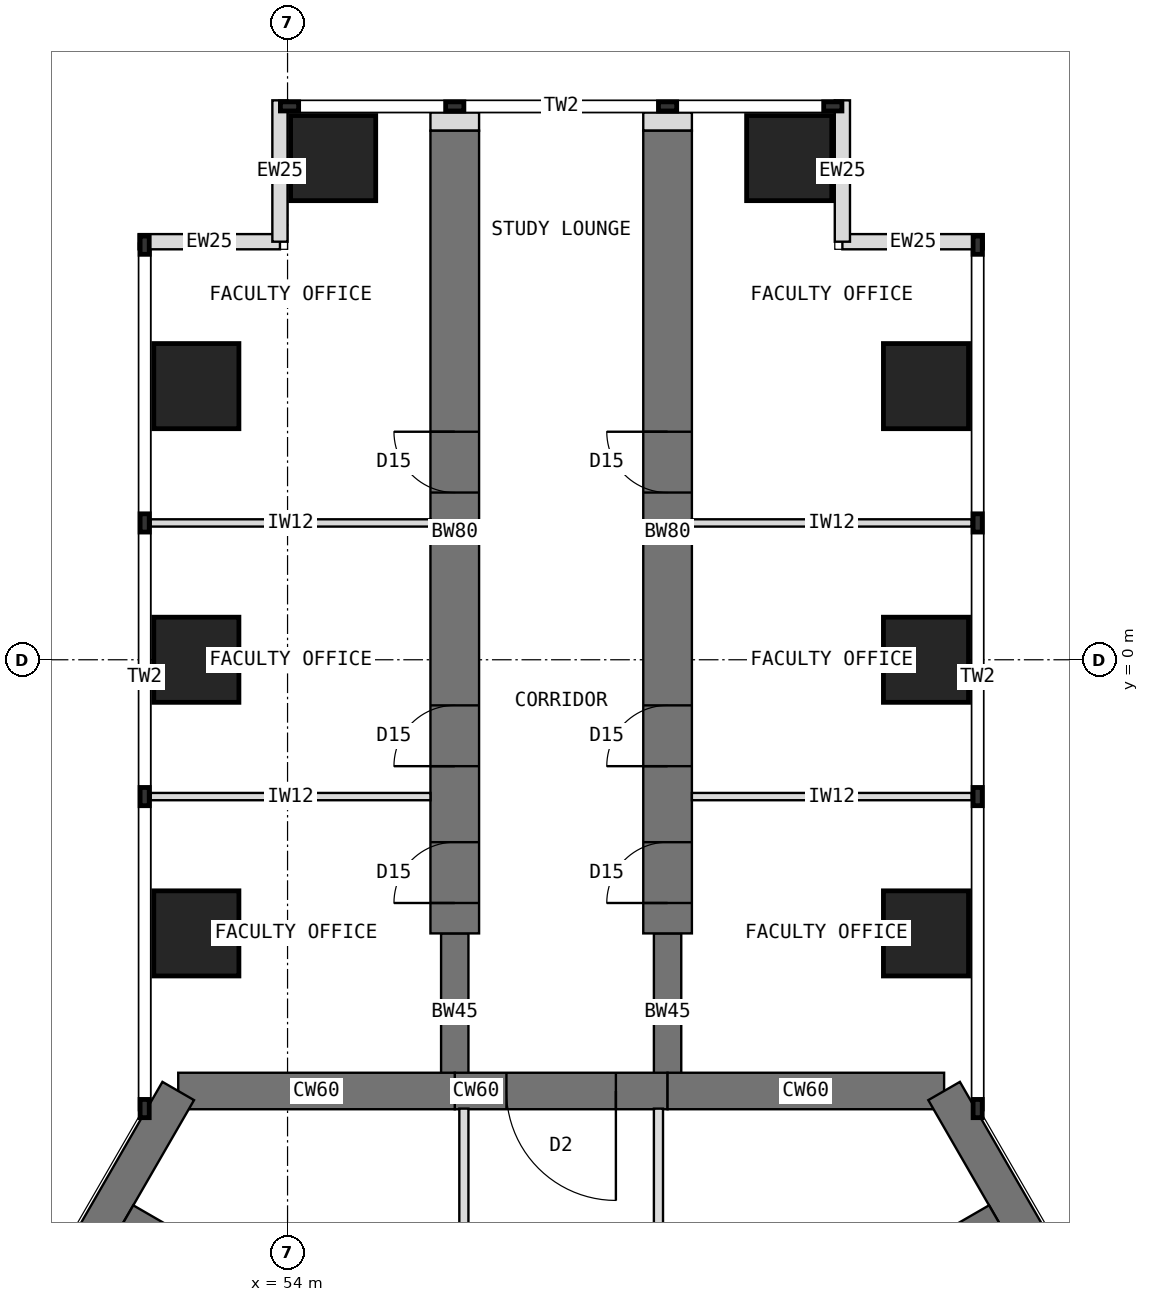
"""IFC4 building model, lengths in metres.
Left out: names, types, materials, properties, quantities, classifications, styles, units other than length and angle.
Written with IfcOpenShell. Run it as: python <this file> out.ifc"""

import sys

from ifc_helpers import new_model, si_unit, direction, frame, frame_2d, origin, origin_2d, place, context, subcontext, project, spatial, rectangle, extrude, element, fill, save


model = new_model("IFC4")
c1 = context("Model", 3, precision=1e-05, world=origin(), true_north=direction((0.0, 1.0)))
c2 = subcontext(c1, "Body", "Model", "MODEL_VIEW")
j1 = project(units=[si_unit("LENGTHUNIT", "METRE"), si_unit("PLANEANGLEUNIT", "RADIAN")], contexts=[c1])
p1 = place(None, origin())
s1 = spatial("IfcSite", under=j1, at=p1, CompositionType="ELEMENT")
p2 = place(p1, origin())
s2 = spatial("IfcBuilding", under=s1, at=p2, CompositionType="ELEMENT")
p3 = place(p2, frame((0.0, 0.0, 97.5)))
s3 = spatial("IfcBuildingStorey", under=s2, at=p3, CompositionType="ELEMENT", Elevation=97.5)
p4 = place(p3, frame((64.798, -7.092, 0.0), z_axis=(0.0, 0.0, 1.0), x_axis=(-1.0, 0.0, 0.0)))
e1 = element("IfcWall", 1, at=p4, inside=s3, PredefinedType="SHEAR", context=c2, shape_type="SweptSolid", body=[
    extrude(rectangle(XDim=4.548, YDim=0.6, at=frame_2d((2.274, 0.0))), origin(), (0.0, 0.0, 1.0), 4.0),
])
p5 = place(p3, frame((60.25, -7.092, 0.0), z_axis=(0.0, 0.0, 1.0), x_axis=(-1.0, 0.0, 0.0)))
e2 = element("IfcWall", 2, at=p5, inside=s3, PredefinedType="SHEAR", context=c2, shape_type="SweptSolid", body=[
    extrude(rectangle(XDim=3.5, YDim=0.6, at=frame_2d((1.75, 0.0))), origin(), (0.0, 0.0, 1.0), 4.0),
])
p6 = place(p5, frame((0.85, 0.0, 0.0)))
e3 = element("IfcOpeningElement", 3, at=p6, cuts=e2, PredefinedType="OPENING", context=c2, shape_type="SweptSolid", body=[
    extrude(rectangle(XDim=1.8, YDim=2.1, at=frame_2d((0.9, 1.05))), frame((0.0, 0.31, 0.0), z_axis=(0.0, -1.0, 0.0), x_axis=(1.0, 0.0, 0.0)), (0.0, 0.0, 1.0), 0.62),
])
p7 = place(p3, frame((56.75, -7.092, 0.0), z_axis=(0.0, 0.0, 1.0), x_axis=(-1.0, 0.0, 0.0)))
e4 = element("IfcWall", 4, at=p7, inside=s3, PredefinedType="SHEAR", context=c2, shape_type="SweptSolid", body=[
    extrude(rectangle(XDim=4.548, YDim=0.6, at=frame_2d((2.274, 0.0))), origin(), (0.0, 0.0, 1.0), 4.0),
])
for number, where, z_axis, x_axis in (
    (5, (52.202, -7.092, 0.0), (0.0, 0.0, 1.0), (-0.5, -0.866, 0.0)),
    (6, (71.096, -18.0, 0.0), (0.0, 0.0, 1.0), (-0.5, 0.866, 0.0)),
):
    element("IfcWall", number, at=place(p3, frame(where, z_axis=z_axis, x_axis=x_axis)), inside=s3, PredefinedType="SHEAR", context=c2, shape_type="SweptSolid", body=[
        extrude(rectangle(XDim=12.596, YDim=0.6, at=frame_2d((6.298, 0.0))), origin(), (0.0, 0.0, 1.0), 4.0),
    ])
p8 = place(p3, frame((56.75, -7.092, 0.0), z_axis=(0.0, 0.0, 1.0), x_axis=(0.0, 1.0, 0.0)))
e7 = element("IfcWall", 7, at=p8, inside=s3, PredefinedType="SHEAR", context=c2, shape_type="SweptSolid", body=[
    extrude(rectangle(XDim=2.592, YDim=0.45, at=frame_2d((1.296, 0.0))), origin(), (0.0, 0.0, 1.0), 4.0),
])
p9 = place(p3, frame((56.75, -4.5, 0.0), z_axis=(0.0, 0.0, 1.0), x_axis=(0.0, 1.0, 0.0)))
e8 = element("IfcWall", 8, at=p9, inside=s3, PredefinedType="SHEAR", context=c2, shape_type="SweptSolid", body=[
    extrude(rectangle(XDim=13.2, YDim=0.8, at=frame_2d((6.6, 0.0))), origin(), (0.0, 0.0, 1.0), 4.0),
])
p10 = place(p9, frame((0.5, 0.0, 0.0)))
e9 = element("IfcOpeningElement", 9, at=p10, cuts=e8, PredefinedType="OPENING", context=c2, shape_type="SweptSolid", body=[
    extrude(rectangle(XDim=1.0, YDim=2.1, at=frame_2d((0.5, 1.05))), frame((0.0, 0.41, 0.0), z_axis=(0.0, -1.0, 0.0), x_axis=(1.0, 0.0, 0.0)), (0.0, 0.0, 1.0), 0.82),
])
p11 = place(p9, frame((2.75, 0.0, 0.0)))
e10 = element("IfcOpeningElement", 10, at=p11, cuts=e8, PredefinedType="OPENING", context=c2, shape_type="SweptSolid", body=[
    extrude(rectangle(XDim=1.0, YDim=2.1, at=frame_2d((0.5, 1.05))), frame((0.0, 0.41, 0.0), z_axis=(0.0, -1.0, 0.0), x_axis=(1.0, 0.0, 0.0)), (0.0, 0.0, 1.0), 0.82),
])
p12 = place(p9, frame((7.25, 0.0, 0.0)))
e11 = element("IfcOpeningElement", 11, at=p12, cuts=e8, PredefinedType="OPENING", context=c2, shape_type="SweptSolid", body=[
    extrude(rectangle(XDim=1.0, YDim=2.1, at=frame_2d((0.5, 1.05))), frame((0.0, 0.41, 0.0), z_axis=(0.0, -1.0, 0.0), x_axis=(1.0, 0.0, 0.0)), (0.0, 0.0, 1.0), 0.82),
])
p13 = place(p3, frame((60.25, -7.092, 0.0), z_axis=(0.0, 0.0, 1.0), x_axis=(0.0, 1.0, 0.0)))
e12 = element("IfcWall", 12, at=p13, inside=s3, PredefinedType="SHEAR", context=c2, shape_type="SweptSolid", body=[
    extrude(rectangle(XDim=2.592, YDim=0.45, at=frame_2d((1.296, 0.0))), origin(), (0.0, 0.0, 1.0), 4.0),
])
p14 = place(p3, frame((60.25, -4.5, 0.0), z_axis=(0.0, 0.0, 1.0), x_axis=(0.0, 1.0, 0.0)))
e13 = element("IfcWall", 13, at=p14, inside=s3, PredefinedType="SHEAR", context=c2, shape_type="SweptSolid", body=[
    extrude(rectangle(XDim=13.2, YDim=0.8, at=frame_2d((6.6, 0.0))), origin(), (0.0, 0.0, 1.0), 4.0),
])
p15 = place(p14, frame((0.5, 0.0, 0.0)))
e14 = element("IfcOpeningElement", 14, at=p15, cuts=e13, PredefinedType="OPENING", context=c2, shape_type="SweptSolid", body=[
    extrude(rectangle(XDim=1.0, YDim=2.1, at=frame_2d((0.5, 1.05))), frame((0.0, 0.41, 0.0), z_axis=(0.0, -1.0, 0.0), x_axis=(1.0, 0.0, 0.0)), (0.0, 0.0, 1.0), 0.82),
])
p16 = place(p14, frame((2.75, 0.0, 0.0)))
e15 = element("IfcOpeningElement", 15, at=p16, cuts=e13, PredefinedType="OPENING", context=c2, shape_type="SweptSolid", body=[
    extrude(rectangle(XDim=1.0, YDim=2.1, at=frame_2d((0.5, 1.05))), frame((0.0, 0.41, 0.0), z_axis=(0.0, -1.0, 0.0), x_axis=(1.0, 0.0, 0.0)), (0.0, 0.0, 1.0), 0.82),
])
p17 = place(p14, frame((7.25, 0.0, 0.0)))
e16 = element("IfcOpeningElement", 16, at=p17, cuts=e13, PredefinedType="OPENING", context=c2, shape_type="SweptSolid", body=[
    extrude(rectangle(XDim=1.0, YDim=2.1, at=frame_2d((0.5, 1.05))), frame((0.0, 0.41, 0.0), z_axis=(0.0, -1.0, 0.0), x_axis=(1.0, 0.0, 0.0)), (0.0, 0.0, 1.0), 0.82),
])
for number, where, z_axis, x_axis in (
    (17, (52.5, -4.5, 0.0), (0.0, 0.0, 1.0), (1.0, 0.0, 0.0)),
    (18, (64.5, -4.5, 0.0), (0.0, 0.0, 1.0), (1.0, 0.0, 0.0)),
    (19, (52.5, 0.0, 0.0), (0.0, 0.0, 1.0), (1.0, 0.0, 0.0)),
    (20, (64.5, 0.0, 0.0), (0.0, 0.0, 1.0), (1.0, 0.0, 0.0)),
    (21, (52.5, 4.5, 0.0), (0.0, 0.0, 1.0), (1.0, 0.0, 0.0)),
    (22, (64.5, 4.5, 0.0), (0.0, 0.0, 1.0), (1.0, 0.0, 0.0)),
    (23, (54.75, 8.25, 0.0), (0.0, 0.0, 1.0), (1.0, 0.0, 0.0)),
    (24, (62.25, 8.25, 0.0), (0.0, 0.0, 1.0), (1.0, 0.0, 0.0)),
):
    element("IfcColumn", number, at=place(p3, frame(where, z_axis=z_axis, x_axis=x_axis)), inside=s3, PredefinedType="COLUMN", context=c2, shape_type="SweptSolid", body=[
        extrude(rectangle(XDim=1.4, YDim=1.4, at=origin_2d()), origin(), (0.0, 0.0, 1.0), 4.0),
    ])
for number, where, z_axis, x_axis in (
    (25, (51.55, 6.875, 0.0), (0.0, 0.0, 1.0), (1.0, 0.0, 0.0)),
    (26, (53.875, 6.875, 0.0), (0.0, 0.0, 1.0), (0.0, 1.0, 0.0)),
    (27, (65.45, 6.875, 0.0), (0.0, 0.0, 1.0), (-1.0, 0.0, 0.0)),
    (28, (63.125, 6.875, 0.0), (0.0, 0.0, 1.0), (0.0, 1.0, 0.0)),
):
    element("IfcWall", number, at=place(p3, frame(where, z_axis=z_axis, x_axis=x_axis)), inside=s3, PredefinedType="STANDARD", context=c2, shape_type="SweptSolid", body=[
        extrude(rectangle(XDim=2.325, YDim=0.25, at=frame_2d((1.163, 0.0))), origin(), (0.0, 0.0, 1.0), 3.8),
    ])
for number, where, z_axis, x_axis in (
    (29, (56.75, 8.7, 0.0), (0.0, 0.0, 1.0), (0.0, 1.0, 0.0)),
    (30, (60.25, 8.7, 0.0), (0.0, 0.0, 1.0), (0.0, 1.0, 0.0)),
):
    element("IfcWall", number, at=place(p3, frame(where, z_axis=z_axis, x_axis=x_axis)), inside=s3, PredefinedType="PARTITIONING", context=c2, shape_type="SweptSolid", body=[
        extrude(rectangle(XDim=0.3, YDim=0.8, at=frame_2d((0.15, 0.0))), origin(), (0.0, 0.0, 1.0), 3.8),
    ])
for number, where, z_axis, x_axis in (
    (31, (56.48, -12.099, 0.0), (0.0, 0.0, 1.0), (-0.866, 0.5, 0.0)),
    (32, (60.52, -12.099, 0.0), (0.0, 0.0, 1.0), (0.866, 0.5, 0.0)),
):
    element("IfcWall", number, at=place(p3, frame(where, z_axis=z_axis, x_axis=x_axis)), inside=s3, PredefinedType="SHEAR", context=c2, shape_type="SweptSolid", body=[
        extrude(rectangle(XDim=5.908, YDim=0.4, at=frame_2d((2.954, 0.0))), origin(), (0.0, 0.0, 1.0), 4.0),
    ])
for number, where, z_axis, x_axis in (
    (33, (56.35, -2.25, 0.0), (0.0, 0.0, 1.0), (-1.0, 0.0, 0.0)),
    (34, (56.35, 2.25, 0.0), (0.0, 0.0, 1.0), (-1.0, 0.0, 0.0)),
    (35, (60.65, -2.25, 0.0), (0.0, 0.0, 1.0), (1.0, 0.0, 0.0)),
    (36, (60.65, 2.25, 0.0), (0.0, 0.0, 1.0), (1.0, 0.0, 0.0)),
):
    element("IfcWall", number, at=place(p3, frame(where, z_axis=z_axis, x_axis=x_axis)), inside=s3, PredefinedType="PARTITIONING", context=c2, shape_type="SweptSolid", body=[
        extrude(rectangle(XDim=4.6, YDim=0.12, at=frame_2d((2.3, 0.0))), origin(), (0.0, 0.0, 1.0), 3.8),
    ])
p18 = place(p3, frame((56.9, -12.477, 0.0), z_axis=(0.0, 0.0, 1.0), x_axis=(0.0, 1.0, 0.0)))
e37 = element("IfcWall", 37, at=p18, inside=s3, PredefinedType="PARTITIONING", context=c2, shape_type="SweptSolid", body=[
    extrude(rectangle(XDim=5.096, YDim=0.15, at=frame_2d((2.548, 0.0))), origin(), (0.0, 0.0, 1.0), 3.8),
])
p19 = place(p18, frame((1.043, 0.0, 0.0)))
e38 = element("IfcOpeningElement", 38, at=p19, cuts=e37, PredefinedType="OPENING", context=c2, shape_type="SweptSolid", body=[
    extrude(rectangle(XDim=1.0, YDim=2.1, at=frame_2d((0.5, 1.05))), frame((0.0, 0.085, 0.0), z_axis=(0.0, -1.0, 0.0), x_axis=(1.0, 0.0, 0.0)), (0.0, 0.0, 1.0), 0.17),
])
p20 = place(p3, frame((60.1, -7.382, 0.0), z_axis=(0.0, 0.0, 1.0), x_axis=(0.0, -1.0, 0.0)))
e39 = element("IfcWall", 39, at=p20, inside=s3, PredefinedType="PARTITIONING", context=c2, shape_type="SweptSolid", body=[
    extrude(rectangle(XDim=5.096, YDim=0.15, at=frame_2d((2.548, 0.0))), origin(), (0.0, 0.0, 1.0), 3.8),
])
p21 = place(p20, frame((3.053, 0.0, 0.0)))
e40 = element("IfcOpeningElement", 40, at=p21, cuts=e39, PredefinedType="OPENING", context=c2, shape_type="SweptSolid", body=[
    extrude(rectangle(XDim=1.0, YDim=2.1, at=frame_2d((0.5, 1.05))), frame((0.0, 0.085, 0.0), z_axis=(0.0, -1.0, 0.0), x_axis=(1.0, 0.0, 0.0)), (0.0, 0.0, 1.0), 0.17),
])
p22 = place(p6, origin())
e41 = element("IfcDoor", 41, at=p22, inside=s3, OperationType="DOUBLE_DOOR_DOUBLE_SWING", PredefinedType="DOOR", context=c2, shape_type="SweptSolid", body=[
    extrude(rectangle(XDim=1.72, YDim=2.06, at=frame_2d((0.9, 1.03))), frame((0.0, 0.025, 0.0), z_axis=(0.0, -1.0, 0.0), x_axis=(1.0, 0.0, 0.0)), (0.0, 0.0, 1.0), 0.05),
    extrude(rectangle(XDim=0.04, YDim=2.1, at=frame_2d((0.02, 1.05))), frame((0.0, 0.3, 0.0), z_axis=(0.0, -1.0, 0.0), x_axis=(1.0, 0.0, 0.0)), (0.0, 0.0, 1.0), 0.6),
    extrude(rectangle(XDim=0.04, YDim=2.1, at=frame_2d((1.78, 1.05))), frame((0.0, 0.3, 0.0), z_axis=(0.0, -1.0, 0.0), x_axis=(1.0, 0.0, 0.0)), (0.0, 0.0, 1.0), 0.6),
    extrude(rectangle(XDim=1.72, YDim=0.04, at=frame_2d((0.9, 2.08))), frame((0.0, 0.3, 0.0), z_axis=(0.0, -1.0, 0.0), x_axis=(1.0, 0.0, 0.0)), (0.0, 0.0, 1.0), 0.6),
])
fill(e3, e41)
p23 = place(p10, origin())
e42 = element("IfcDoor", 42, at=p23, inside=s3, OperationType="SINGLE_SWING_LEFT", PredefinedType="DOOR", context=c2, shape_type="SweptSolid", body=[
    extrude(rectangle(XDim=0.92, YDim=2.06, at=frame_2d((0.5, 1.03))), frame((0.0, 0.025, 0.0), z_axis=(0.0, -1.0, 0.0), x_axis=(1.0, 0.0, 0.0)), (0.0, 0.0, 1.0), 0.05),
    extrude(rectangle(XDim=0.04, YDim=2.1, at=frame_2d((0.02, 1.05))), frame((0.0, 0.4, 0.0), z_axis=(0.0, -1.0, 0.0), x_axis=(1.0, 0.0, 0.0)), (0.0, 0.0, 1.0), 0.8),
    extrude(rectangle(XDim=0.04, YDim=2.1, at=frame_2d((0.98, 1.05))), frame((0.0, 0.4, 0.0), z_axis=(0.0, -1.0, 0.0), x_axis=(1.0, 0.0, 0.0)), (0.0, 0.0, 1.0), 0.8),
    extrude(rectangle(XDim=0.92, YDim=0.04, at=frame_2d((0.5, 2.08))), frame((0.0, 0.4, 0.0), z_axis=(0.0, -1.0, 0.0), x_axis=(1.0, 0.0, 0.0)), (0.0, 0.0, 1.0), 0.8),
])
fill(e9, e42)
p24 = place(p11, origin())
e43 = element("IfcDoor", 43, at=p24, inside=s3, OperationType="SINGLE_SWING_LEFT", PredefinedType="DOOR", context=c2, shape_type="SweptSolid", body=[
    extrude(rectangle(XDim=0.92, YDim=2.06, at=frame_2d((0.5, 1.03))), frame((0.0, 0.025, 0.0), z_axis=(0.0, -1.0, 0.0), x_axis=(1.0, 0.0, 0.0)), (0.0, 0.0, 1.0), 0.05),
    extrude(rectangle(XDim=0.04, YDim=2.1, at=frame_2d((0.02, 1.05))), frame((0.0, 0.4, 0.0), z_axis=(0.0, -1.0, 0.0), x_axis=(1.0, 0.0, 0.0)), (0.0, 0.0, 1.0), 0.8),
    extrude(rectangle(XDim=0.04, YDim=2.1, at=frame_2d((0.98, 1.05))), frame((0.0, 0.4, 0.0), z_axis=(0.0, -1.0, 0.0), x_axis=(1.0, 0.0, 0.0)), (0.0, 0.0, 1.0), 0.8),
    extrude(rectangle(XDim=0.92, YDim=0.04, at=frame_2d((0.5, 2.08))), frame((0.0, 0.4, 0.0), z_axis=(0.0, -1.0, 0.0), x_axis=(1.0, 0.0, 0.0)), (0.0, 0.0, 1.0), 0.8),
])
fill(e10, e43)
p25 = place(p12, origin())
e44 = element("IfcDoor", 44, at=p25, inside=s3, OperationType="SINGLE_SWING_RIGHT", PredefinedType="DOOR", context=c2, shape_type="SweptSolid", body=[
    extrude(rectangle(XDim=0.92, YDim=2.06, at=frame_2d((0.5, 1.03))), frame((0.0, 0.025, 0.0), z_axis=(0.0, -1.0, 0.0), x_axis=(1.0, 0.0, 0.0)), (0.0, 0.0, 1.0), 0.05),
    extrude(rectangle(XDim=0.04, YDim=2.1, at=frame_2d((0.02, 1.05))), frame((0.0, 0.4, 0.0), z_axis=(0.0, -1.0, 0.0), x_axis=(1.0, 0.0, 0.0)), (0.0, 0.0, 1.0), 0.8),
    extrude(rectangle(XDim=0.04, YDim=2.1, at=frame_2d((0.98, 1.05))), frame((0.0, 0.4, 0.0), z_axis=(0.0, -1.0, 0.0), x_axis=(1.0, 0.0, 0.0)), (0.0, 0.0, 1.0), 0.8),
    extrude(rectangle(XDim=0.92, YDim=0.04, at=frame_2d((0.5, 2.08))), frame((0.0, 0.4, 0.0), z_axis=(0.0, -1.0, 0.0), x_axis=(1.0, 0.0, 0.0)), (0.0, 0.0, 1.0), 0.8),
])
fill(e11, e44)
p26 = place(p15, origin())
e45 = element("IfcDoor", 45, at=p26, inside=s3, OperationType="SINGLE_SWING_LEFT", PredefinedType="DOOR", context=c2, shape_type="SweptSolid", body=[
    extrude(rectangle(XDim=0.92, YDim=2.06, at=frame_2d((0.5, 1.03))), frame((0.0, 0.025, 0.0), z_axis=(0.0, -1.0, 0.0), x_axis=(1.0, 0.0, 0.0)), (0.0, 0.0, 1.0), 0.05),
    extrude(rectangle(XDim=0.04, YDim=2.1, at=frame_2d((0.02, 1.05))), frame((0.0, 0.4, 0.0), z_axis=(0.0, -1.0, 0.0), x_axis=(1.0, 0.0, 0.0)), (0.0, 0.0, 1.0), 0.8),
    extrude(rectangle(XDim=0.04, YDim=2.1, at=frame_2d((0.98, 1.05))), frame((0.0, 0.4, 0.0), z_axis=(0.0, -1.0, 0.0), x_axis=(1.0, 0.0, 0.0)), (0.0, 0.0, 1.0), 0.8),
    extrude(rectangle(XDim=0.92, YDim=0.04, at=frame_2d((0.5, 2.08))), frame((0.0, 0.4, 0.0), z_axis=(0.0, -1.0, 0.0), x_axis=(1.0, 0.0, 0.0)), (0.0, 0.0, 1.0), 0.8),
])
fill(e14, e45)
p27 = place(p16, origin())
e46 = element("IfcDoor", 46, at=p27, inside=s3, OperationType="SINGLE_SWING_LEFT", PredefinedType="DOOR", context=c2, shape_type="SweptSolid", body=[
    extrude(rectangle(XDim=0.92, YDim=2.06, at=frame_2d((0.5, 1.03))), frame((0.0, 0.025, 0.0), z_axis=(0.0, -1.0, 0.0), x_axis=(1.0, 0.0, 0.0)), (0.0, 0.0, 1.0), 0.05),
    extrude(rectangle(XDim=0.04, YDim=2.1, at=frame_2d((0.02, 1.05))), frame((0.0, 0.4, 0.0), z_axis=(0.0, -1.0, 0.0), x_axis=(1.0, 0.0, 0.0)), (0.0, 0.0, 1.0), 0.8),
    extrude(rectangle(XDim=0.04, YDim=2.1, at=frame_2d((0.98, 1.05))), frame((0.0, 0.4, 0.0), z_axis=(0.0, -1.0, 0.0), x_axis=(1.0, 0.0, 0.0)), (0.0, 0.0, 1.0), 0.8),
    extrude(rectangle(XDim=0.92, YDim=0.04, at=frame_2d((0.5, 2.08))), frame((0.0, 0.4, 0.0), z_axis=(0.0, -1.0, 0.0), x_axis=(1.0, 0.0, 0.0)), (0.0, 0.0, 1.0), 0.8),
])
fill(e15, e46)
p28 = place(p17, origin())
e47 = element("IfcDoor", 47, at=p28, inside=s3, OperationType="SINGLE_SWING_RIGHT", PredefinedType="DOOR", context=c2, shape_type="SweptSolid", body=[
    extrude(rectangle(XDim=0.92, YDim=2.06, at=frame_2d((0.5, 1.03))), frame((0.0, 0.025, 0.0), z_axis=(0.0, -1.0, 0.0), x_axis=(1.0, 0.0, 0.0)), (0.0, 0.0, 1.0), 0.05),
    extrude(rectangle(XDim=0.04, YDim=2.1, at=frame_2d((0.02, 1.05))), frame((0.0, 0.4, 0.0), z_axis=(0.0, -1.0, 0.0), x_axis=(1.0, 0.0, 0.0)), (0.0, 0.0, 1.0), 0.8),
    extrude(rectangle(XDim=0.04, YDim=2.1, at=frame_2d((0.98, 1.05))), frame((0.0, 0.4, 0.0), z_axis=(0.0, -1.0, 0.0), x_axis=(1.0, 0.0, 0.0)), (0.0, 0.0, 1.0), 0.8),
    extrude(rectangle(XDim=0.92, YDim=0.04, at=frame_2d((0.5, 2.08))), frame((0.0, 0.4, 0.0), z_axis=(0.0, -1.0, 0.0), x_axis=(1.0, 0.0, 0.0)), (0.0, 0.0, 1.0), 0.8),
])
fill(e16, e47)
save(model, sys.argv[1])
